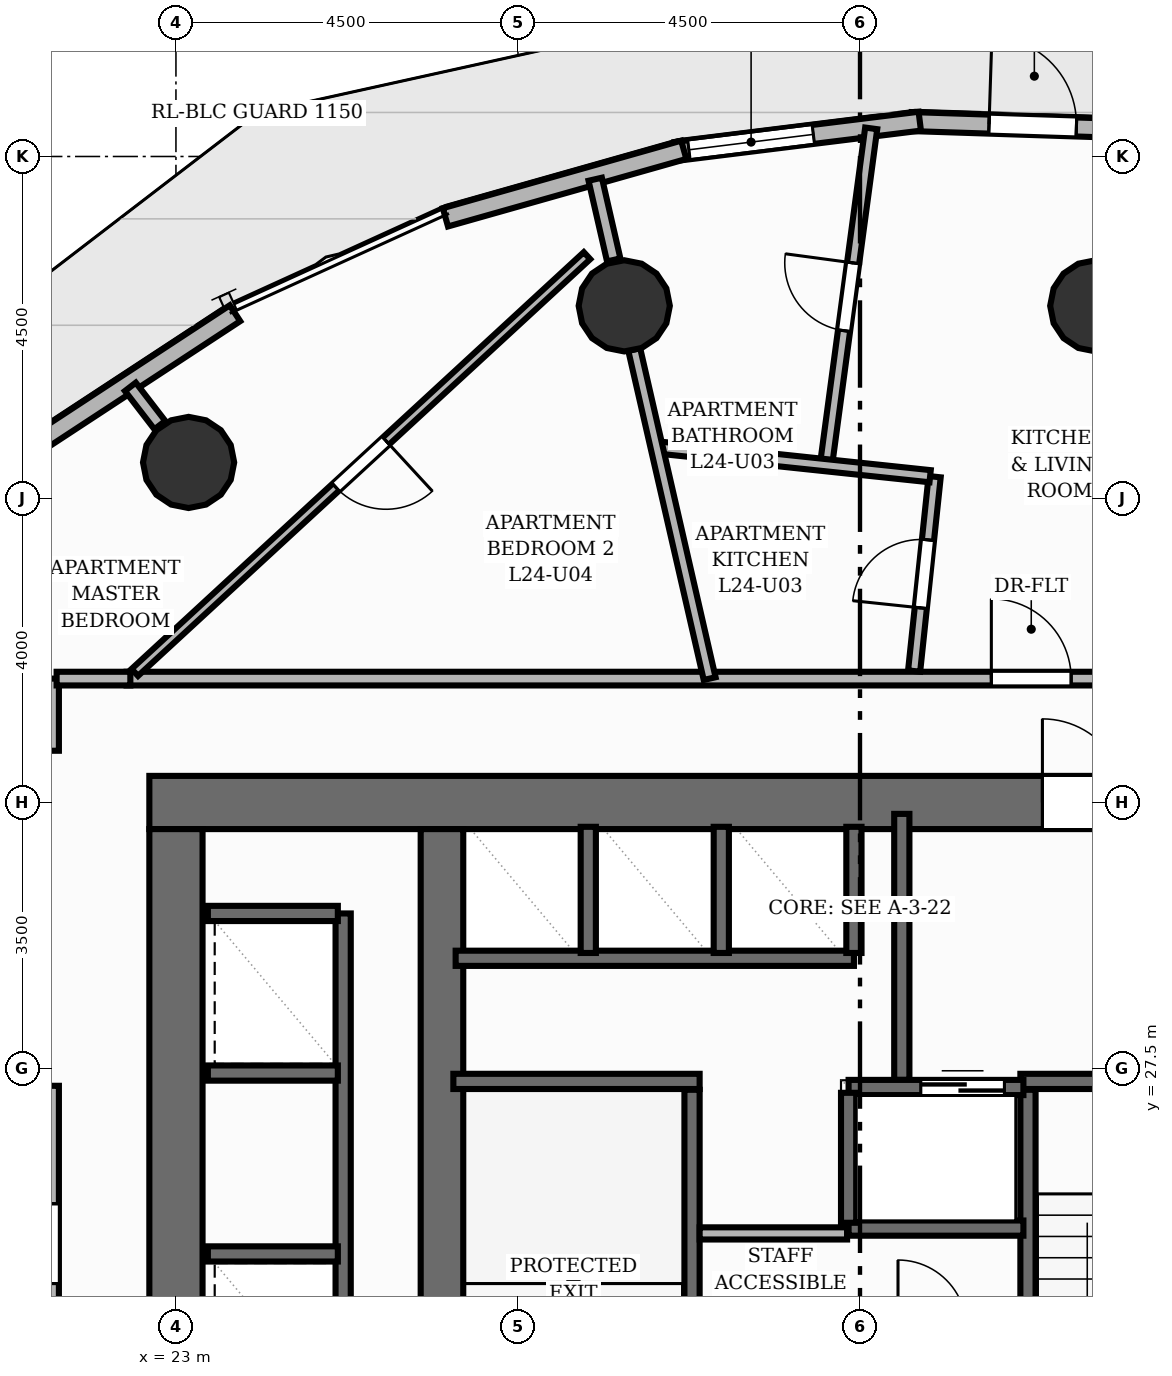
"""IFC4 building model, lengths in metres.
Left out: names, types, materials, properties, quantities, classifications, styles, units other than length and angle.
Written with IfcOpenShell. Run it as: python <this file> out.ifc"""

import sys

from ifc_helpers import new_model, si_unit, direction, frame, frame_2d, origin, origin_2d, place, context, subcontext, project, spatial, rectangle, circle, extrude, element, fill, save


model = new_model("IFC4")
c1 = context("Model", 3, precision=1e-05, world=origin(), true_north=direction((0.0, 1.0)))
c2 = subcontext(c1, "Body", "Model", "MODEL_VIEW")
j1 = project(units=[si_unit("LENGTHUNIT", "METRE"), si_unit("PLANEANGLEUNIT", "RADIAN")], contexts=[c1])
p1 = place(None, origin())
s1 = spatial("IfcSite", under=j1, at=p1, CompositionType="ELEMENT")
p2 = place(p1, origin())
s2 = spatial("IfcBuilding", under=s1, at=p2, CompositionType="ELEMENT")
p3 = place(p2, frame((0.0, 0.0, 83.68)))
s3 = spatial("IfcBuildingStorey", under=s2, at=p3, CompositionType="ELEMENT", Elevation=83.68)
p4 = place(p3, frame((22.65, 31.0, 0.0), z_axis=(0.0, 0.0, 1.0), x_axis=(1.0, 0.0, 0.0)))
e1 = element("IfcWall", 1, at=p4, inside=s3, PredefinedType="SHEAR", context=c2, shape_type="SweptSolid", body=[
    extrude(rectangle(XDim=18.7, YDim=0.7, at=frame_2d((9.35, 0.0))), origin(), (0.0, 0.0, 1.0), 3.2),
])
p5 = place(p4, frame((11.75, 0.0, 0.0)))
e2 = element("IfcOpeningElement", 2, at=p5, cuts=e1, PredefinedType="OPENING", context=c2, shape_type="SweptSolid", body=[
    extrude(rectangle(XDim=1.1, YDim=2.15, at=frame_2d((0.55, 1.075))), frame((0.0, 0.36, 0.0), z_axis=(0.0, -1.0, 0.0), x_axis=(1.0, 0.0, 0.0)), (0.0, 0.0, 1.0), 0.72),
])
p6 = place(p3, frame((23.0, 17.35, 0.0), z_axis=(0.0, 0.0, 1.0), x_axis=(0.0, 1.0, 0.0)))
e3 = element("IfcWall", 3, at=p6, inside=s3, PredefinedType="SHEAR", context=c2, shape_type="SweptSolid", body=[
    extrude(rectangle(XDim=13.3, YDim=0.7, at=frame_2d((6.65, 0.0))), origin(), (0.0, 0.0, 1.0), 3.2),
])
p7 = place(p3, frame((26.5, 17.35, 0.0), z_axis=(0.0, 0.0, 1.0), x_axis=(0.0, 1.0, 0.0)))
e4 = element("IfcWall", 4, at=p7, inside=s3, PredefinedType="SHEAR", context=c2, shape_type="SweptSolid", body=[
    extrude(rectangle(XDim=13.3, YDim=0.56, at=frame_2d((6.65, 0.0))), origin(), (0.0, 0.0, 1.0), 3.2),
])
for number, where, z_axis, x_axis in (
    (5, (35.102, 37.535, 0.0), (0.0, 0.0, 1.0), (1.0, 0.0, 0.0)),
    (6, (28.898, 37.535, 0.0), (0.0, 0.0, 1.0), (1.0, 0.0, 0.0)),
    (7, (23.167, 35.474, 0.0), (0.0, 0.0, 1.0), (1.0, 0.0, 0.0)),
):
    element("IfcColumn", number, at=place(p3, frame(where, z_axis=z_axis, x_axis=x_axis)), inside=s3, PredefinedType="COLUMN", context=c2, shape_type="SweptSolid", body=[
        extrude(circle(Radius=0.6, at=origin_2d()), origin(), (0.0, 0.0, 1.0), 3.2),
    ])
p8 = place(p3, frame((32.677, 39.959, 0.0), z_axis=(0.0, 0.0, 1.0), x_axis=(0.999464092211, -0.032734208101, 0.0)))
e8 = element("IfcWall", 8, at=p8, inside=s3, PredefinedType="SOLIDWALL", context=c2, shape_type="SweptSolid", body=[
    extrude(rectangle(XDim=3.192, YDim=0.25, at=frame_2d((1.596, 0.0))), origin(), (0.0, 0.0, 1.0), 2.96),
])
p9 = place(p8, frame((1.021, 0.0, 0.0)))
e9 = element("IfcOpeningElement", 9, at=p9, cuts=e8, PredefinedType="OPENING", context=c2, shape_type="SweptSolid", body=[
    extrude(rectangle(XDim=1.15, YDim=2.2, at=frame_2d((0.575, 1.1))), frame((0.0, 0.135, 0.0), z_axis=(0.0, -1.0, 0.0), x_axis=(1.0, 0.0, 0.0)), (0.0, 0.0, 1.0), 0.27),
])
p10 = place(p3, frame((29.575, 39.566, 0.0), z_axis=(0.0, 0.0, 1.0), x_axis=(0.99241077266, 0.122966899235, 0.0)))
e10 = element("IfcWall", 10, at=p10, inside=s3, PredefinedType="SOLIDWALL", context=c2, shape_type="SweptSolid", body=[
    extrude(rectangle(XDim=3.236, YDim=0.25, at=frame_2d((1.618, 0.0))), origin(), (0.0, 0.0, 1.0), 2.96),
])
p11 = place(p10, frame((0.175, 0.0, 0.85)))
e11 = element("IfcOpeningElement", 11, at=p11, cuts=e10, PredefinedType="OPENING", context=c2, shape_type="SweptSolid", body=[
    extrude(rectangle(XDim=1.65, YDim=1.55, at=frame_2d((0.825, 0.775))), frame((0.0, 0.135, 0.0), z_axis=(0.0, -1.0, 0.0), x_axis=(1.0, 0.0, 0.0)), (0.0, 0.0, 1.0), 0.27),
])
p12 = place(p3, frame((26.545, 38.699, 0.0), z_axis=(0.0, 0.0, 1.0), x_axis=(0.962134911526, 0.272573681825, 0.0)))
e12 = element("IfcWall", 12, at=p12, inside=s3, PredefinedType="SOLIDWALL", context=c2, shape_type="SweptSolid", body=[
    extrude(rectangle(XDim=3.26, YDim=0.25, at=frame_2d((1.63, 0.0))), origin(), (0.0, 0.0, 1.0), 2.96),
])
p13 = place(p3, frame((21.071, 35.663, 0.0), z_axis=(0.0, 0.0, 1.0), x_axis=(0.836273856728, 0.548311988336, 0.0)))
e13 = element("IfcWall", 13, at=p13, inside=s3, PredefinedType="SOLIDWALL", context=c2, shape_type="SweptSolid", body=[
    extrude(rectangle(XDim=3.236, YDim=0.25, at=frame_2d((1.618, 0.0))), origin(), (0.0, 0.0, 1.0), 2.96),
])
p14 = place(p3, frame((29.79, 20.78, 0.0), z_axis=(0.0, 0.0, 1.0), x_axis=(0.0, 1.0, 0.0)))
e14 = element("IfcWall", 14, at=p14, inside=s3, PredefinedType="SHEAR", context=c2, shape_type="SweptSolid", body=[
    extrude(rectangle(XDim=6.44, YDim=0.2, at=frame_2d((3.22, 0.0))), origin(), (0.0, 0.0, 1.0), 3.2),
])
p15 = place(p3, frame((26.65, 27.33, 0.0), z_axis=(0.0, 0.0, 1.0), x_axis=(1.0, 0.0, 0.0)))
e15 = element("IfcWall", 15, at=p15, inside=s3, PredefinedType="SHEAR", context=c2, shape_type="SweptSolid", body=[
    extrude(rectangle(XDim=3.24, YDim=0.2, at=frame_2d((1.62, 0.0))), origin(), (0.0, 0.0, 1.0), 3.2),
])
p16 = place(p3, frame((34.21, 20.78, 0.0), z_axis=(0.0, 0.0, 1.0), x_axis=(0.0, 1.0, 0.0)))
e16 = element("IfcWall", 16, at=p16, inside=s3, PredefinedType="SHEAR", context=c2, shape_type="SweptSolid", body=[
    extrude(rectangle(XDim=6.44, YDim=0.2, at=frame_2d((3.22, 0.0))), origin(), (0.0, 0.0, 1.0), 3.2),
])
p17 = place(p3, frame((34.11, 27.33, 0.0), z_axis=(0.0, 0.0, 1.0), x_axis=(1.0, 0.0, 0.0)))
e17 = element("IfcWall", 17, at=p17, inside=s3, PredefinedType="SHEAR", context=c2, shape_type="SweptSolid", body=[
    extrude(rectangle(XDim=3.24, YDim=0.2, at=frame_2d((1.62, 0.0))), origin(), (0.0, 0.0, 1.0), 3.2),
])
p18 = place(p17, frame((1.135, 0.0, 0.0)))
e18 = element("IfcOpeningElement", 18, at=p18, cuts=e17, PredefinedType="OPENING", context=c2, shape_type="SweptSolid", body=[
    extrude(rectangle(XDim=1.05, YDim=2.15, at=frame_2d((0.525, 1.075))), frame((0.0, 0.11, 0.0), z_axis=(0.0, -1.0, 0.0), x_axis=(1.0, 0.0, 0.0)), (0.0, 0.0, 1.0), 0.22),
])
p19 = place(p3, frame((32.55, 27.35, 0.0), z_axis=(0.0, 0.0, 1.0), x_axis=(0.0, 1.0, 0.0)))
e19 = element("IfcWall", 19, at=p19, inside=s3, PredefinedType="SHEAR", context=c2, shape_type="SweptSolid", body=[
    extrude(rectangle(XDim=3.5, YDim=0.2, at=frame_2d((1.75, 0.0))), origin(), (0.0, 0.0, 1.0), 3.2),
])
p20 = place(p3, frame((31.85, 27.25, 0.0), z_axis=(0.0, 0.0, 1.0), x_axis=(1.0, 0.0, 0.0)))
e20 = element("IfcWall", 20, at=p20, inside=s3, PredefinedType="SHEAR", context=c2, shape_type="SweptSolid", body=[
    extrude(rectangle(XDim=2.3, YDim=0.2, at=frame_2d((1.15, 0.0))), origin(), (0.0, 0.0, 1.0), 3.2),
])
p21 = place(p20, frame((0.95, 0.0, 0.0)))
e21 = element("IfcOpeningElement", 21, at=p21, cuts=e20, PredefinedType="OPENING", context=c2, shape_type="SweptSolid", body=[
    extrude(rectangle(XDim=1.1, YDim=2.15, at=frame_2d((0.55, 1.075))), frame((0.0, 0.11, 0.0), z_axis=(0.0, -1.0, 0.0), x_axis=(1.0, 0.0, 0.0)), (0.0, 0.0, 1.0), 0.22),
])
p22 = place(p3, frame((31.85, 25.4, 0.0), z_axis=(0.0, 0.0, 1.0), x_axis=(1.0, 0.0, 0.0)))
e22 = element("IfcWall", 22, at=p22, inside=s3, PredefinedType="SHEAR", context=c2, shape_type="SweptSolid", body=[
    extrude(rectangle(XDim=2.3, YDim=0.2, at=frame_2d((1.15, 0.0))), origin(), (0.0, 0.0, 1.0), 3.2),
])
p23 = place(p3, frame((31.85, 25.47, 0.0), z_axis=(0.0, 0.0, 1.0), x_axis=(0.0, 1.0, 0.0)))
e23 = element("IfcWall", 23, at=p23, inside=s3, PredefinedType="SHEAR", context=c2, shape_type="SweptSolid", body=[
    extrude(rectangle(XDim=1.71, YDim=0.2, at=frame_2d((0.855, 0.0))), origin(), (0.0, 0.0, 1.0), 3.2),
])
p24 = place(p3, frame((25.2, 18.46, 0.0), z_axis=(0.0, 0.0, 1.0), x_axis=(0.0, 1.0, 0.0)))
e24 = element("IfcWall", 24, at=p24, inside=s3, PredefinedType="SHEAR", context=c2, shape_type="SweptSolid", body=[
    extrude(rectangle(XDim=11.08, YDim=0.2, at=frame_2d((5.54, 0.0))), origin(), (0.0, 0.0, 1.0), 3.2),
])
for number, where, z_axis, x_axis in (
    (25, (23.42, 29.54, 0.0), (0.0, 0.0, 1.0), (1.0, 0.0, 0.0)),
    (26, (23.42, 25.06, 0.0), (0.0, 0.0, 1.0), (1.0, 0.0, 0.0)),
    (27, (23.42, 27.44, 0.0), (0.0, 0.0, 1.0), (1.0, 0.0, 0.0)),
):
    element("IfcWall", number, at=place(p3, frame(where, z_axis=z_axis, x_axis=x_axis)), inside=s3, PredefinedType="SHEAR", context=c2, shape_type="SweptSolid", body=[
        extrude(rectangle(XDim=1.71, YDim=0.2, at=frame_2d((0.855, 0.0))), origin(), (0.0, 0.0, 1.0), 3.2),
    ])
p25 = place(p3, frame((26.68, 28.95, 0.0), z_axis=(0.0, 0.0, 1.0), x_axis=(1.0, 0.0, 0.0)))
e28 = element("IfcWall", 28, at=p25, inside=s3, PredefinedType="SHEAR", context=c2, shape_type="SweptSolid", body=[
    extrude(rectangle(XDim=5.24, YDim=0.2, at=frame_2d((2.62, 0.0))), origin(), (0.0, 0.0, 1.0), 3.2),
])
for number, where, z_axis, x_axis in (
    (29, (31.92, 29.02, 0.0), (0.0, 0.0, 1.0), (0.0, 1.0, 0.0)),
    (30, (28.425, 29.02, 0.0), (0.0, 0.0, 1.0), (0.0, 1.0, 0.0)),
    (31, (30.175, 29.02, 0.0), (0.0, 0.0, 1.0), (0.0, 1.0, 0.0)),
):
    element("IfcWall", number, at=place(p3, frame(where, z_axis=z_axis, x_axis=x_axis)), inside=s3, PredefinedType="SHEAR", context=c2, shape_type="SweptSolid", body=[
        extrude(rectangle(XDim=1.66, YDim=0.2, at=frame_2d((0.83, 0.0))), origin(), (0.0, 0.0, 1.0), 3.2),
    ])
p26 = place(p3, frame((29.89, 25.33, 0.0), z_axis=(0.0, 0.0, 1.0), x_axis=(1.0, 0.0, 0.0)))
e32 = element("IfcWall", 32, at=p26, inside=s3, PredefinedType="PLUMBINGWALL", context=c2, shape_type="SweptSolid", body=[
    extrude(rectangle(XDim=1.94, YDim=0.16, at=frame_2d((0.97, 0.0))), origin(), (0.0, 0.0, 1.0), 2.955),
])
p27 = place(p3, frame((28.76, 38.139, 0.0), z_axis=(0.0, 0.0, 1.0), x_axis=(-0.223287406217, 0.974752652843, 0.0)))
e33 = element("IfcWall", 33, at=p27, inside=s3, PredefinedType="PARTITIONING", context=c2, shape_type="SweptSolid", body=[
    extrude(rectangle(XDim=1.089, YDim=0.18, at=frame_2d((0.544, 0.0))), origin(), (0.0, 0.0, 1.0), 2.261),
])
p28 = place(p3, frame((22.788, 35.966, 0.0), z_axis=(0.0, 0.0, 1.0), x_axis=(-0.609970610867, 0.792424036661, 0.0)))
e34 = element("IfcWall", 34, at=p28, inside=s3, PredefinedType="PARTITIONING", context=c2, shape_type="SweptSolid", body=[
    extrude(rectangle(XDim=0.635, YDim=0.18, at=frame_2d((0.318, 0.0))), origin(), (0.0, 0.0, 1.0), 2.261),
])
p29 = place(p3, frame((22.351, 32.63, 0.0), z_axis=(0.0, 0.0, 1.0), x_axis=(1.0, 0.0, 0.0)))
e35 = element("IfcWall", 35, at=p29, inside=s3, PredefinedType="PARTITIONING", context=c2, shape_type="SweptSolid", body=[
    extrude(rectangle(XDim=20.279, YDim=0.18, at=frame_2d((10.14, 0.0))), origin(), (0.0, 0.0, 1.0), 2.955),
])
p30 = place(p29, frame((11.378, 0.0, 0.0)))
e36 = element("IfcOpeningElement", 36, at=p30, cuts=e35, PredefinedType="OPENING", context=c2, shape_type="SweptSolid", body=[
    extrude(rectangle(XDim=1.05, YDim=2.15, at=frame_2d((0.525, 1.075))), frame((0.0, 0.1, 0.0), z_axis=(0.0, -1.0, 0.0), x_axis=(1.0, 0.0, 0.0)), (0.0, 0.0, 1.0), 0.2),
])
p31 = place(p3, frame((21.37, 23.118, 0.0), z_axis=(0.0, 0.0, 1.0), x_axis=(0.0, 1.0, 0.0)))
e37 = element("IfcWall", 37, at=p31, inside=s3, PredefinedType="PARTITIONING", context=c2, shape_type="SweptSolid", body=[
    extrude(rectangle(XDim=4.154, YDim=0.18, at=frame_2d((2.077, 0.0))), origin(), (0.0, 0.0, 1.0), 2.955),
])
p32 = place(p31, frame((1.552, 0.0, 0.0)))
e38 = element("IfcOpeningElement", 38, at=p32, cuts=e37, PredefinedType="OPENING", context=c2, shape_type="SweptSolid", body=[
    extrude(rectangle(XDim=1.05, YDim=2.15, at=frame_2d((0.525, 1.075))), frame((0.0, 0.1, 0.0), z_axis=(0.0, -1.0, 0.0), x_axis=(1.0, 0.0, 0.0)), (0.0, 0.0, 1.0), 0.2),
])
p33 = place(p3, frame((21.37, 31.681, 0.0), z_axis=(0.0, 0.0, 1.0), x_axis=(0.0, 1.0, 0.0)))
e39 = element("IfcWall", 39, at=p33, inside=s3, PredefinedType="PARTITIONING", context=c2, shape_type="SweptSolid", body=[
    extrude(rectangle(XDim=0.949, YDim=0.18, at=frame_2d((0.475, 0.0))), origin(), (0.0, 0.0, 1.0), 2.955),
])
p34 = place(p3, frame((21.43, 32.63, 0.0), z_axis=(0.0, 0.0, 1.0), x_axis=(1.0, 0.0, 0.0)))
e40 = element("IfcWall", 40, at=p34, inside=s3, PredefinedType="PARTITIONING", context=c2, shape_type="SweptSolid", body=[
    extrude(rectangle(XDim=0.97, YDim=0.18, at=frame_2d((0.485, 0.0))), origin(), (0.0, 0.0, 1.0), 2.955),
])
p35 = place(p3, frame((31.552, 35.438, 0.0), z_axis=(0.0, 0.0, 1.0), x_axis=(0.132986130607, 0.991117898671, 0.0)))
e41 = element("IfcWall", 41, at=p35, inside=s3, PredefinedType="PLUMBINGWALL", context=c2, shape_type="SweptSolid", body=[
    extrude(rectangle(XDim=4.472, YDim=0.16, at=frame_2d((2.236, 0.0))), origin(), (0.0, 0.0, 1.0), 2.955),
])
p36 = place(p35, frame((1.786, 0.0, 0.0)))
e42 = element("IfcOpeningElement", 42, at=p36, cuts=e41, PredefinedType="OPENING", context=c2, shape_type="SweptSolid", body=[
    extrude(rectangle(XDim=0.9, YDim=2.1, at=frame_2d((0.45, 1.05))), frame((0.0, 0.09, 0.0), z_axis=(0.0, -1.0, 0.0), x_axis=(1.0, 0.0, 0.0)), (0.0, 0.0, 1.0), 0.18),
])
p37 = place(p3, frame((32.712, 32.729, 0.0), z_axis=(0.0, 0.0, 1.0), x_axis=(0.105094954285, 0.994462191631, 0.0)))
e43 = element("IfcWall", 43, at=p37, inside=s3, PredefinedType="PLUMBINGWALL", context=c2, shape_type="SweptSolid", body=[
    extrude(rectangle(XDim=2.572, YDim=0.16, at=frame_2d((1.286, 0.0))), origin(), (0.0, 0.0, 1.0), 2.641),
])
p38 = place(p37, frame((0.836, 0.0, 0.0)))
e44 = element("IfcOpeningElement", 44, at=p38, cuts=e43, PredefinedType="OPENING", context=c2, shape_type="SweptSolid", body=[
    extrude(rectangle(XDim=0.9, YDim=2.1, at=frame_2d((0.45, 1.05))), frame((0.0, 0.09, 0.0), z_axis=(0.0, -1.0, 0.0), x_axis=(1.0, 0.0, 0.0)), (0.0, 0.0, 1.0), 0.18),
])
p39 = place(p3, frame((32.923, 35.293, 0.0), z_axis=(0.0, 0.0, 1.0), x_axis=(-0.994472124215, 0.105000924563, 0.0)))
e45 = element("IfcWall", 45, at=p39, inside=s3, PredefinedType="PLUMBINGWALL", context=c2, shape_type="SweptSolid", body=[
    extrude(rectangle(XDim=3.618, YDim=0.16, at=frame_2d((1.809, 0.0))), origin(), (0.0, 0.0, 1.0), 2.955),
])
p40 = place(p3, frame((30.022, 32.63, 0.0), z_axis=(0.0, 0.0, 1.0), x_axis=(-0.223321757884, 0.974744783241, 0.0)))
e46 = element("IfcWall", 46, at=p40, inside=s3, PredefinedType="PLUMBINGWALL", context=c2, shape_type="SweptSolid", body=[
    extrude(rectangle(XDim=4.442, YDim=0.16, at=frame_2d((2.221, 0.0))), origin(), (0.0, 0.0, 1.0), 2.261),
])
p41 = place(p3, frame((28.408, 38.195, 0.0), z_axis=(0.0, 0.0, 1.0), x_axis=(-0.735306461181, -0.677734762386, 0.0)))
e47 = element("IfcWall", 47, at=p41, inside=s3, PredefinedType="PARTITIONING", context=c2, shape_type="SweptSolid", body=[
    extrude(rectangle(XDim=8.091, YDim=0.125, at=frame_2d((4.045, 0.0))), origin(), (0.0, 0.0, 1.0), 2.404),
])
p42 = place(p41, frame((3.596, 0.0, 0.0)))
e48 = element("IfcOpeningElement", 48, at=p42, cuts=e47, PredefinedType="OPENING", context=c2, shape_type="SweptSolid", body=[
    extrude(rectangle(XDim=0.9, YDim=2.1, at=frame_2d((0.45, 1.05))), frame((0.0, 0.073, 0.0), z_axis=(0.0, -1.0, 0.0), x_axis=(1.0, 0.0, 0.0)), (0.0, 0.0, 1.0), 0.145),
])
p43 = place(p9, origin())
e49 = element("IfcDoor", 49, at=p43, inside=s3, OperationType="SINGLE_SWING_LEFT", PredefinedType="DOOR", context=c2, shape_type="SweptSolid", body=[
    extrude(rectangle(XDim=1.15, YDim=2.2, at=frame_2d((0.575, 1.1))), frame((0.0, 0.025, 0.0), z_axis=(0.0, -1.0, 0.0), x_axis=(1.0, 0.0, 0.0)), (0.0, 0.0, 1.0), 0.05),
])
fill(e9, e49)
p44 = place(p11, origin())
e50 = element("IfcWindow", 50, at=p44, inside=s3, PartitioningType="SINGLE_PANEL", PredefinedType="WINDOW", context=c2, shape_type="SweptSolid", body=[
    extrude(rectangle(XDim=1.65, YDim=1.55, at=frame_2d((0.825, 0.775))), frame((0.0, 0.03, 0.0), z_axis=(0.0, -1.0, 0.0), x_axis=(1.0, 0.0, 0.0)), (0.0, 0.0, 1.0), 0.06),
])
fill(e11, e50)
p45 = place(p5, origin())
e51 = element("IfcDoor", 51, at=p45, inside=s3, OperationType="SINGLE_SWING_LEFT", PredefinedType="DOOR", context=c2, shape_type="SweptSolid", body=[
    extrude(rectangle(XDim=1.1, YDim=2.15, at=frame_2d((0.55, 1.075))), frame((0.0, 0.025, 0.0), z_axis=(0.0, -1.0, 0.0), x_axis=(1.0, 0.0, 0.0)), (0.0, 0.0, 1.0), 0.05),
])
fill(e2, e51)
p46 = place(p21, origin())
e52 = element("IfcDoor", 52, at=p46, inside=s3, OperationType="DOUBLE_DOOR_SLIDING", PredefinedType="DOOR", context=c2, shape_type="SweptSolid", body=[
    extrude(rectangle(XDim=1.1, YDim=2.15, at=frame_2d((0.55, 1.075))), frame((0.0, 0.025, 0.0), z_axis=(0.0, -1.0, 0.0), x_axis=(1.0, 0.0, 0.0)), (0.0, 0.0, 1.0), 0.05),
])
fill(e21, e52)
p47 = place(p30, origin())
e53 = element("IfcDoor", 53, at=p47, inside=s3, OperationType="SINGLE_SWING_LEFT", PredefinedType="DOOR", context=c2, shape_type="SweptSolid", body=[
    extrude(rectangle(XDim=1.05, YDim=2.15, at=frame_2d((0.525, 1.075))), frame((0.0, 0.025, 0.0), z_axis=(0.0, -1.0, 0.0), x_axis=(1.0, 0.0, 0.0)), (0.0, 0.0, 1.0), 0.05),
])
fill(e36, e53)
p48 = place(p36, origin())
e54 = element("IfcDoor", 54, at=p48, inside=s3, OperationType="SINGLE_SWING_RIGHT", PredefinedType="DOOR", context=c2, shape_type="SweptSolid", body=[
    extrude(rectangle(XDim=0.9, YDim=2.1, at=frame_2d((0.45, 1.05))), frame((0.0, 0.025, 0.0), z_axis=(0.0, -1.0, 0.0), x_axis=(1.0, 0.0, 0.0)), (0.0, 0.0, 1.0), 0.05),
])
fill(e42, e54)
p49 = place(p38, origin())
e55 = element("IfcDoor", 55, at=p49, inside=s3, OperationType="SINGLE_SWING_LEFT", PredefinedType="DOOR", context=c2, shape_type="SweptSolid", body=[
    extrude(rectangle(XDim=0.9, YDim=2.1, at=frame_2d((0.45, 1.05))), frame((0.0, 0.025, 0.0), z_axis=(0.0, -1.0, 0.0), x_axis=(1.0, 0.0, 0.0)), (0.0, 0.0, 1.0), 0.05),
])
fill(e44, e55)
p50 = place(p32, origin())
e56 = element("IfcDoor", 56, at=p50, inside=s3, OperationType="SINGLE_SWING_RIGHT", PredefinedType="DOOR", context=c2, shape_type="SweptSolid", body=[
    extrude(rectangle(XDim=1.05, YDim=2.15, at=frame_2d((0.525, 1.075))), frame((0.0, 0.025, 0.0), z_axis=(0.0, -1.0, 0.0), x_axis=(1.0, 0.0, 0.0)), (0.0, 0.0, 1.0), 0.05),
])
fill(e38, e56)
p51 = place(p42, origin())
e57 = element("IfcDoor", 57, at=p51, inside=s3, OperationType="SINGLE_SWING_LEFT", PredefinedType="DOOR", context=c2, shape_type="SweptSolid", body=[
    extrude(rectangle(XDim=0.9, YDim=2.1, at=frame_2d((0.45, 1.05))), frame((0.0, 0.025, 0.0), z_axis=(0.0, -1.0, 0.0), x_axis=(1.0, 0.0, 0.0)), (0.0, 0.0, 1.0), 0.05),
])
fill(e48, e57)
save(model, sys.argv[1])
